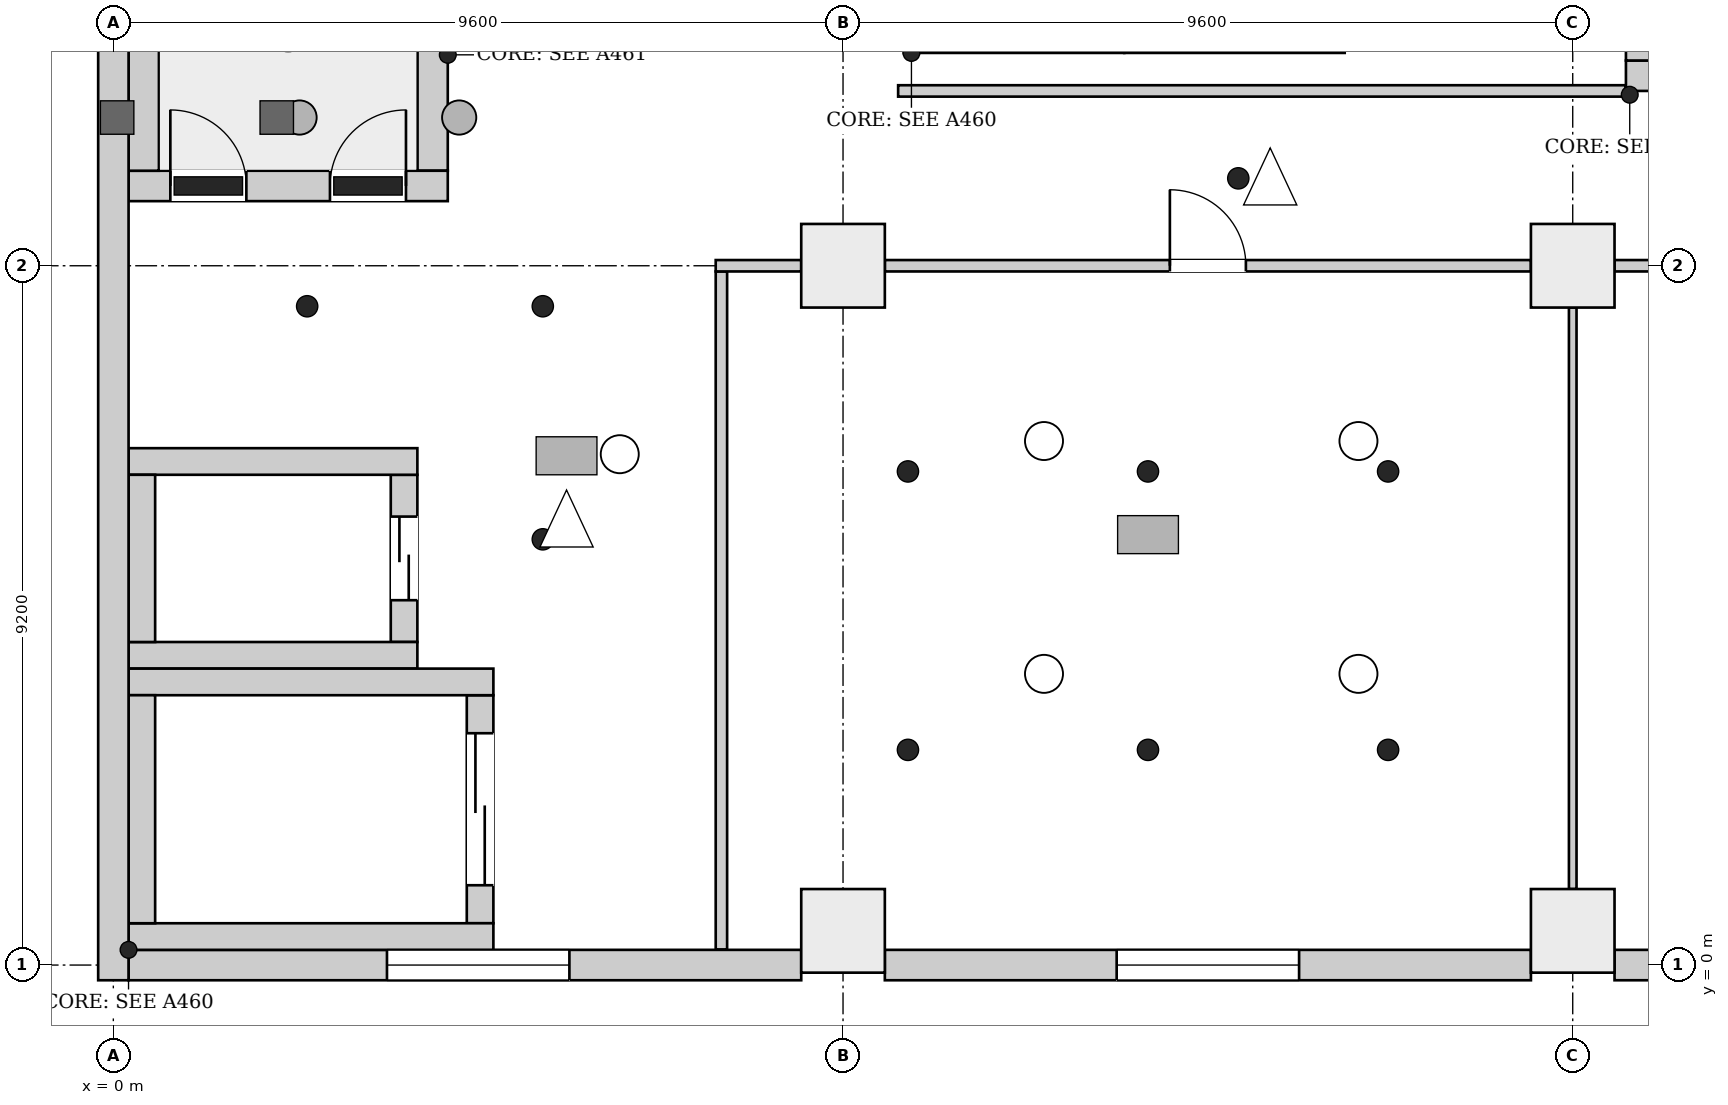
"""IFC4 building model, lengths in metres.
Left out: names, types, materials, properties, quantities, classifications, styles, units other than length and angle.
Written with IfcOpenShell. Run it as: python <this file> out.ifc"""

import sys

from ifc_helpers import new_model, si_unit, direction, frame, frame_2d, origin, origin_2d, place, context, subcontext, project, spatial, rectangle, extrude, element, fill, save


model = new_model("IFC4")
c1 = context("Model", 3, precision=1e-05, world=origin(), true_north=direction((0.0, 1.0)))
c2 = subcontext(c1, "Body", "Model", "MODEL_VIEW")
j1 = project(units=[si_unit("LENGTHUNIT", "METRE"), si_unit("PLANEANGLEUNIT", "RADIAN")], contexts=[c1])
p1 = place(None, origin())
s1 = spatial("IfcSite", under=j1, at=p1, CompositionType="ELEMENT")
p2 = place(p1, origin())
s2 = spatial("IfcBuilding", under=s1, at=p2, CompositionType="ELEMENT")
p3 = place(p2, frame((0.0, 0.0, 26.7)))
s3 = spatial("IfcBuildingStorey", under=s2, at=p3, CompositionType="ELEMENT", Elevation=26.7)
p4 = place(p3, frame((0.0, -0.2, 0.0), z_axis=(0.0, 0.0, 1.0), x_axis=(0.0, 1.0, 0.0)))
e1 = element("IfcWall", 1, at=p4, inside=s3, PredefinedType="SHEAR", context=c2, shape_type="SweptSolid", body=[
    extrude(rectangle(XDim=46.88, YDim=0.4, at=frame_2d((23.44, 0.0))), origin(), (0.0, 0.0, 1.0), 5.2),
])
p5 = place(p3, frame((0.2, 10.25, 0.0), z_axis=(0.0, 0.0, 1.0), x_axis=(1.0, 0.0, 0.0)))
e2 = element("IfcWall", 2, at=p5, inside=s3, PredefinedType="SHEAR", context=c2, shape_type="SweptSolid", body=[
    extrude(rectangle(XDim=4.2, YDim=0.4, at=frame_2d((2.1, 0.0))), origin(), (0.0, 0.0, 1.0), 5.2),
])
p6 = place(p5, frame((0.55, 0.0, 0.0)))
e3 = element("IfcOpeningElement", 3, at=p6, cuts=e2, PredefinedType="OPENING", context=c2, shape_type="SweptSolid", body=[
    extrude(rectangle(XDim=1.0, YDim=2.1, at=frame_2d((0.5, 1.05))), frame((0.0, 0.21, 0.0), z_axis=(0.0, -1.0, 0.0), x_axis=(1.0, 0.0, 0.0)), (0.0, 0.0, 1.0), 0.42),
])
p7 = place(p5, frame((2.65, 0.0, 0.0)))
e4 = element("IfcOpeningElement", 4, at=p7, cuts=e2, PredefinedType="OPENING", context=c2, shape_type="SweptSolid", body=[
    extrude(rectangle(XDim=1.0, YDim=2.1, at=frame_2d((0.5, 1.05))), frame((0.0, 0.21, 0.0), z_axis=(0.0, -1.0, 0.0), x_axis=(1.0, 0.0, 0.0)), (0.0, 0.0, 1.0), 0.42),
])
for number, where, z_axis, x_axis in (
    (5, (0.4, 10.45, 0.0), (0.0, 0.0, 1.0), (0.0, 1.0, 0.0)),
    (6, (4.2, 10.45, 0.0), (0.0, 0.0, 1.0), (0.0, 1.0, 0.0)),
):
    element("IfcWall", number, at=place(p3, frame(where, z_axis=z_axis, x_axis=x_axis)), inside=s3, PredefinedType="SHEAR", context=c2, shape_type="SweptSolid", body=[
        extrude(rectangle(XDim=6.6, YDim=0.4, at=frame_2d((3.3, 0.0))), origin(), (0.0, 0.0, 1.0), 5.2),
    ])
for number, where, z_axis, x_axis in (
    (7, (0.2, 0.375, 0.0), (0.0, 0.0, 1.0), (1.0, 0.0, 0.0)),
    (8, (0.2, 3.725, 0.0), (0.0, 0.0, 1.0), (1.0, 0.0, 0.0)),
):
    element("IfcWall", number, at=place(p3, frame(where, z_axis=z_axis, x_axis=x_axis)), inside=s3, PredefinedType="SHEAR", context=c2, shape_type="SweptSolid", body=[
        extrude(rectangle(XDim=4.8, YDim=0.35, at=frame_2d((2.4, 0.0))), origin(), (0.0, 0.0, 1.0), 4.85),
    ])
p8 = place(p3, frame((0.375, 0.55, 0.0), z_axis=(0.0, 0.0, 1.0), x_axis=(0.0, 1.0, 0.0)))
e9 = element("IfcWall", 9, at=p8, inside=s3, PredefinedType="SHEAR", context=c2, shape_type="SweptSolid", body=[
    extrude(rectangle(XDim=3.0, YDim=0.35, at=frame_2d((1.5, 0.0))), origin(), (0.0, 0.0, 1.0), 4.85),
])
p9 = place(p3, frame((4.825, 0.55, 0.0), z_axis=(0.0, 0.0, 1.0), x_axis=(0.0, 1.0, 0.0)))
e10 = element("IfcWall", 10, at=p9, inside=s3, PredefinedType="SHEAR", context=c2, shape_type="SweptSolid", body=[
    extrude(rectangle(XDim=3.0, YDim=0.35, at=frame_2d((1.5, 0.0))), origin(), (0.0, 0.0, 1.0), 4.85),
])
p10 = place(p9, frame((0.5, 0.0, 0.0)))
e11 = element("IfcOpeningElement", 11, at=p10, cuts=e10, PredefinedType="OPENING", context=c2, shape_type="SweptSolid", body=[
    extrude(rectangle(XDim=2.0, YDim=2.4, at=frame_2d((1.0, 1.2))), frame((0.0, 0.185, 0.0), z_axis=(0.0, -1.0, 0.0), x_axis=(1.0, 0.0, 0.0)), (0.0, 0.0, 1.0), 0.37),
])
for number, where, z_axis, x_axis in (
    (12, (0.2, 4.075, 0.0), (0.0, 0.0, 1.0), (1.0, 0.0, 0.0)),
    (13, (0.2, 6.625, 0.0), (0.0, 0.0, 1.0), (1.0, 0.0, 0.0)),
):
    element("IfcWall", number, at=place(p3, frame(where, z_axis=z_axis, x_axis=x_axis)), inside=s3, PredefinedType="SHEAR", context=c2, shape_type="SweptSolid", body=[
        extrude(rectangle(XDim=3.8, YDim=0.35, at=frame_2d((1.9, 0.0))), origin(), (0.0, 0.0, 1.0), 4.85),
    ])
p11 = place(p3, frame((0.375, 4.25, 0.0), z_axis=(0.0, 0.0, 1.0), x_axis=(0.0, 1.0, 0.0)))
e14 = element("IfcWall", 14, at=p11, inside=s3, PredefinedType="SHEAR", context=c2, shape_type="SweptSolid", body=[
    extrude(rectangle(XDim=2.2, YDim=0.35, at=frame_2d((1.1, 0.0))), origin(), (0.0, 0.0, 1.0), 4.85),
])
p12 = place(p3, frame((3.825, 4.25, 0.0), z_axis=(0.0, 0.0, 1.0), x_axis=(0.0, 1.0, 0.0)))
e15 = element("IfcWall", 15, at=p12, inside=s3, PredefinedType="SHEAR", context=c2, shape_type="SweptSolid", body=[
    extrude(rectangle(XDim=2.2, YDim=0.35, at=frame_2d((1.1, 0.0))), origin(), (0.0, 0.0, 1.0), 4.85),
])
p13 = place(p12, frame((0.55, 0.0, 0.0)))
e16 = element("IfcOpeningElement", 16, at=p13, cuts=e15, PredefinedType="OPENING", context=c2, shape_type="SweptSolid", body=[
    extrude(rectangle(XDim=1.1, YDim=2.1, at=frame_2d((0.55, 1.05))), frame((0.0, 0.185, 0.0), z_axis=(0.0, -1.0, 0.0), x_axis=(1.0, 0.0, 0.0)), (0.0, 0.0, 1.0), 0.37),
])
p14 = place(p3, frame((19.9, 11.7, 0.0), z_axis=(0.0, 0.0, 1.0), x_axis=(1.0, 0.0, 0.0)))
e17 = element("IfcWall", 17, at=p14, inside=s3, PredefinedType="SHEAR", context=c2, shape_type="SweptSolid", body=[
    extrude(rectangle(XDim=3.1, YDim=0.4, at=frame_2d((1.55, 0.0))), origin(), (0.0, 0.0, 1.0), 5.2),
])
p15 = place(p3, frame((20.1, 11.9, 0.0), z_axis=(0.0, 0.0, 1.0), x_axis=(0.0, 1.0, 0.0)))
e18 = element("IfcWall", 18, at=p15, inside=s3, PredefinedType="SHEAR", context=c2, shape_type="SweptSolid", body=[
    extrude(rectangle(XDim=3.4, YDim=0.4, at=frame_2d((1.7, 0.0))), origin(), (0.0, 0.0, 1.0), 5.2),
])
for number, where, z_axis, x_axis in (
    (19, (9.6, 0.45, 0.0), (0.0, 0.0, 1.0), (1.0, 0.0, 0.0)),
    (20, (19.2, 0.45, 0.0), (0.0, 0.0, 1.0), (1.0, 0.0, 0.0)),
    (21, (9.6, 9.2, 0.0), (0.0, 0.0, 1.0), (1.0, 0.0, 0.0)),
    (22, (19.2, 9.2, 0.0), (0.0, 0.0, 1.0), (1.0, 0.0, 0.0)),
):
    element("IfcColumn", number, at=place(p3, frame(where, z_axis=z_axis, x_axis=x_axis)), inside=s3, PredefinedType="COLUMN", context=c2, shape_type="SweptSolid", body=[
        extrude(rectangle(XDim=1.1, YDim=1.1, at=origin_2d()), origin(), (0.0, 0.0, 1.0), 5.2),
    ])
p16 = place(p3, frame((0.2, 0.0, 0.0), z_axis=(0.0, 0.0, 1.0), x_axis=(1.0, 0.0, 0.0)))
e23 = element("IfcWall", 23, at=p16, inside=s3, PredefinedType="ELEMENTEDWALL", context=c2, shape_type="SweptSolid", body=[
    extrude(rectangle(XDim=8.85, YDim=0.4, at=frame_2d((4.425, 0.0))), origin(), (0.0, 0.0, 1.0), 4.85),
])
p17 = place(p16, frame((3.4, 0.0, 1.0)))
e24 = element("IfcOpeningElement", 24, at=p17, cuts=e23, PredefinedType="OPENING", context=c2, shape_type="SweptSolid", body=[
    extrude(rectangle(XDim=2.4, YDim=2.2, at=frame_2d((1.2, 1.1))), frame((0.0, 0.21, 0.0), z_axis=(0.0, -1.0, 0.0), x_axis=(1.0, 0.0, 0.0)), (0.0, 0.0, 1.0), 0.42),
])
p18 = place(p3, frame((10.15, 0.0, 0.0), z_axis=(0.0, 0.0, 1.0), x_axis=(1.0, 0.0, 0.0)))
e25 = element("IfcWall", 25, at=p18, inside=s3, PredefinedType="ELEMENTEDWALL", context=c2, shape_type="SweptSolid", body=[
    extrude(rectangle(XDim=8.5, YDim=0.4, at=frame_2d((4.25, 0.0))), origin(), (0.0, 0.0, 1.0), 4.85),
])
p19 = place(p18, frame((3.05, 0.0, 1.0)))
e26 = element("IfcOpeningElement", 26, at=p19, cuts=e25, PredefinedType="OPENING", context=c2, shape_type="SweptSolid", body=[
    extrude(rectangle(XDim=2.4, YDim=2.2, at=frame_2d((1.2, 1.1))), frame((0.0, 0.21, 0.0), z_axis=(0.0, -1.0, 0.0), x_axis=(1.0, 0.0, 0.0)), (0.0, 0.0, 1.0), 0.42),
])
p20 = place(p3, frame((19.75, 0.0, 0.0), z_axis=(0.0, 0.0, 1.0), x_axis=(1.0, 0.0, 0.0)))
e27 = element("IfcWall", 27, at=p20, inside=s3, PredefinedType="ELEMENTEDWALL", context=c2, shape_type="SweptSolid", body=[
    extrude(rectangle(XDim=8.5, YDim=0.4, at=frame_2d((4.25, 0.0))), origin(), (0.0, 0.0, 1.0), 4.85),
])
p21 = place(p20, frame((3.05, 0.0, 1.0)))
e28 = element("IfcOpeningElement", 28, at=p21, cuts=e27, PredefinedType="OPENING", context=c2, shape_type="SweptSolid", body=[
    extrude(rectangle(XDim=2.4, YDim=2.2, at=frame_2d((1.2, 1.1))), frame((0.0, 0.21, 0.0), z_axis=(0.0, -1.0, 0.0), x_axis=(1.0, 0.0, 0.0)), (0.0, 0.0, 1.0), 0.42),
])
p22 = place(p3, frame((8.0, 0.206, 0.0), z_axis=(0.0, 0.0, 1.0), x_axis=(0.0, 1.0, 0.0)))
e29 = element("IfcWall", 29, at=p22, inside=s3, PredefinedType="PARTITIONING", context=c2, shape_type="SweptSolid", body=[
    extrude(rectangle(XDim=8.919, YDim=0.15, at=frame_2d((4.459, 0.0))), origin(), (0.0, 0.0, 1.0), 4.85),
])
p23 = place(p3, frame((7.925, 9.2, 0.0), z_axis=(0.0, 0.0, 1.0), x_axis=(1.0, 0.0, 0.0)))
e30 = element("IfcWall", 30, at=p23, inside=s3, PredefinedType="PARTITIONING", context=c2, shape_type="SweptSolid", body=[
    extrude(rectangle(XDim=1.125, YDim=0.15, at=frame_2d((0.562, 0.0))), origin(), (0.0, 0.0, 1.0), 4.45),
])
p24 = place(p3, frame((10.15, 9.2, 0.0), z_axis=(0.0, 0.0, 1.0), x_axis=(1.0, 0.0, 0.0)))
e31 = element("IfcWall", 31, at=p24, inside=s3, PredefinedType="PARTITIONING", context=c2, shape_type="SweptSolid", body=[
    extrude(rectangle(XDim=8.5, YDim=0.15, at=frame_2d((4.25, 0.0))), origin(), (0.0, 0.0, 1.0), 4.45),
])
p25 = place(p24, frame((3.75, 0.0, 0.0)))
e32 = element("IfcOpeningElement", 32, at=p25, cuts=e31, PredefinedType="OPENING", context=c2, shape_type="SweptSolid", body=[
    extrude(rectangle(XDim=1.0, YDim=2.1, at=frame_2d((0.5, 1.05))), frame((0.0, 0.085, 0.0), z_axis=(0.0, -1.0, 0.0), x_axis=(1.0, 0.0, 0.0)), (0.0, 0.0, 1.0), 0.17),
])
p26 = place(p3, frame((10.325, 11.5, 0.0), z_axis=(0.0, 0.0, 1.0), x_axis=(1.0, 0.0, 0.0)))
e33 = element("IfcWall", 33, at=p26, inside=s3, PredefinedType="PARTITIONING", context=c2, shape_type="SweptSolid", body=[
    extrude(rectangle(XDim=9.569, YDim=0.15, at=frame_2d((4.785, 0.0))), origin(), (0.0, 0.0, 1.0), 4.85),
])
p27 = place(p3, frame((19.2, 1.0, 0.0), z_axis=(0.0, 0.0, 1.0), x_axis=(0.0, 1.0, 0.0)))
e34 = element("IfcWall", 34, at=p27, inside=s3, PredefinedType="PARTITIONING", context=c2, shape_type="SweptSolid", body=[
    extrude(rectangle(XDim=7.65, YDim=0.1, at=frame_2d((3.825, 0.0))), origin(), (0.0, 0.0, 1.0), 4.45),
])
p28 = place(p3, frame((19.75, 9.2, 0.0), z_axis=(0.0, 0.0, 1.0), x_axis=(1.0, 0.0, 0.0)))
e35 = element("IfcWall", 35, at=p28, inside=s3, PredefinedType="PARTITIONING", context=c2, shape_type="SweptSolid", body=[
    extrude(rectangle(XDim=8.5, YDim=0.15, at=frame_2d((4.25, 0.0))), origin(), (0.0, 0.0, 1.0), 4.45),
])
p29 = place(p28, frame((3.75, 0.0, 0.0)))
e36 = element("IfcOpeningElement", 36, at=p29, cuts=e35, PredefinedType="OPENING", context=c2, shape_type="SweptSolid", body=[
    extrude(rectangle(XDim=1.0, YDim=2.1, at=frame_2d((0.5, 1.05))), frame((0.0, 0.085, 0.0), z_axis=(0.0, -1.0, 0.0), x_axis=(1.0, 0.0, 0.0)), (0.0, 0.0, 1.0), 0.17),
])
p30 = place(p17, origin())
e37 = element("IfcWindow", 37, at=p30, inside=s3, PartitioningType="SINGLE_PANEL", PredefinedType="WINDOW", context=c2, shape_type="SweptSolid", body=[
    extrude(rectangle(XDim=2.4, YDim=2.2, at=frame_2d((1.2, 1.1))), frame((0.0, 0.03, 0.0), z_axis=(0.0, -1.0, 0.0), x_axis=(1.0, 0.0, 0.0)), (0.0, 0.0, 1.0), 0.06),
])
fill(e24, e37)
p31 = place(p19, origin())
e38 = element("IfcWindow", 38, at=p31, inside=s3, PartitioningType="SINGLE_PANEL", PredefinedType="WINDOW", context=c2, shape_type="SweptSolid", body=[
    extrude(rectangle(XDim=2.4, YDim=2.2, at=frame_2d((1.2, 1.1))), frame((0.0, 0.03, 0.0), z_axis=(0.0, -1.0, 0.0), x_axis=(1.0, 0.0, 0.0)), (0.0, 0.0, 1.0), 0.06),
])
fill(e26, e38)
p32 = place(p6, origin())
e39 = element("IfcDoor", 39, at=p32, inside=s3, OperationType="SINGLE_SWING_RIGHT", PredefinedType="DOOR", context=c2, shape_type="SweptSolid", body=[
    extrude(rectangle(XDim=1.0, YDim=2.1, at=frame_2d((0.5, 1.05))), frame((0.0, 0.025, 0.0), z_axis=(0.0, -1.0, 0.0), x_axis=(1.0, 0.0, 0.0)), (0.0, 0.0, 1.0), 0.05),
])
fill(e3, e39)
p33 = place(p7, origin())
e40 = element("IfcDoor", 40, at=p33, inside=s3, OperationType="SINGLE_SWING_LEFT", PredefinedType="DOOR", context=c2, shape_type="SweptSolid", body=[
    extrude(rectangle(XDim=1.0, YDim=2.1, at=frame_2d((0.5, 1.05))), frame((0.0, 0.025, 0.0), z_axis=(0.0, -1.0, 0.0), x_axis=(1.0, 0.0, 0.0)), (0.0, 0.0, 1.0), 0.05),
])
fill(e4, e40)
p34 = place(p10, origin())
e41 = element("IfcDoor", 41, at=p34, inside=s3, OperationType="DOUBLE_DOOR_SLIDING", PredefinedType="DOOR", context=c2, shape_type="SweptSolid", body=[
    extrude(rectangle(XDim=2.0, YDim=2.4, at=frame_2d((1.0, 1.2))), frame((0.0, 0.025, 0.0), z_axis=(0.0, -1.0, 0.0), x_axis=(1.0, 0.0, 0.0)), (0.0, 0.0, 1.0), 0.05),
])
fill(e11, e41)
p35 = place(p13, origin())
e42 = element("IfcDoor", 42, at=p35, inside=s3, OperationType="DOUBLE_DOOR_SLIDING", PredefinedType="DOOR", context=c2, shape_type="SweptSolid", body=[
    extrude(rectangle(XDim=1.1, YDim=2.1, at=frame_2d((0.55, 1.05))), frame((0.0, 0.025, 0.0), z_axis=(0.0, -1.0, 0.0), x_axis=(1.0, 0.0, 0.0)), (0.0, 0.0, 1.0), 0.05),
])
fill(e16, e42)
p36 = place(p25, origin())
e43 = element("IfcDoor", 43, at=p36, inside=s3, OperationType="SINGLE_SWING_RIGHT", PredefinedType="DOOR", context=c2, shape_type="SweptSolid", body=[
    extrude(rectangle(XDim=1.0, YDim=2.1, at=frame_2d((0.5, 1.05))), frame((0.0, 0.025, 0.0), z_axis=(0.0, -1.0, 0.0), x_axis=(1.0, 0.0, 0.0)), (0.0, 0.0, 1.0), 0.05),
])
fill(e32, e43)
save(model, sys.argv[1])
